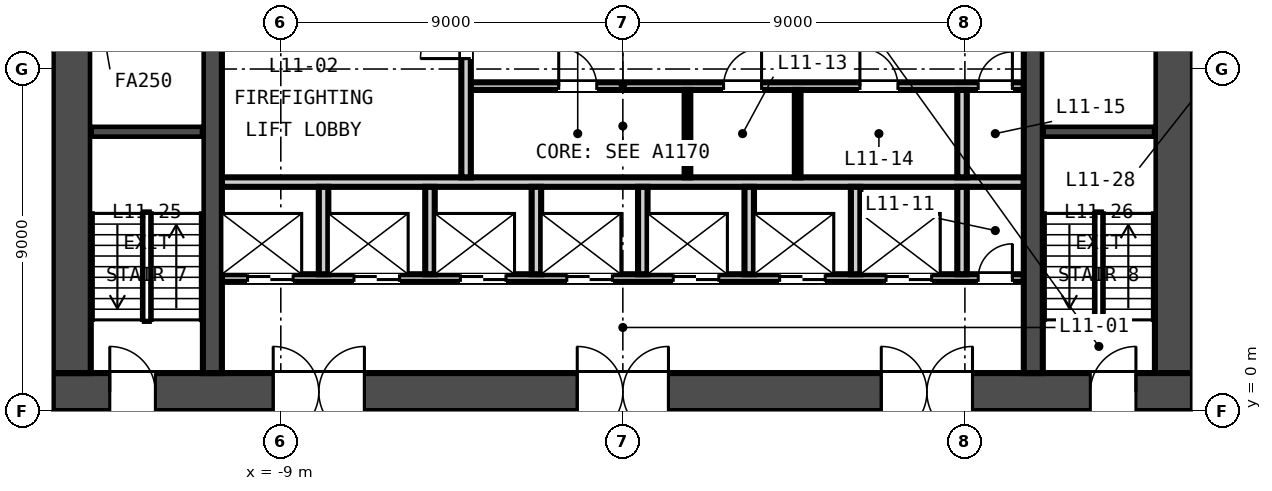
"""IFC4 building model, lengths in metres.
Left out: names, types, materials, properties, quantities, classifications, styles, units other than length and angle.
Written with IfcOpenShell. Run it as: python <this file> out.ifc"""

import sys

from ifc_helpers import new_model, si_unit, direction, frame, frame_2d, origin, place, context, subcontext, project, spatial, rectangle, extrude, element, fill, save


model = new_model("IFC4")
c1 = context("Model", 3, precision=1e-05, world=origin(), true_north=direction((0.0, 1.0)))
c2 = subcontext(c1, "Body", "Model", "MODEL_VIEW")
j1 = project(units=[si_unit("LENGTHUNIT", "METRE"), si_unit("PLANEANGLEUNIT", "RADIAN")], contexts=[c1])
p1 = place(None, origin())
s1 = spatial("IfcSite", under=j1, at=p1, CompositionType="ELEMENT")
p2 = place(p1, origin())
s2 = spatial("IfcBuilding", under=s1, at=p2, CompositionType="ELEMENT")
p3 = place(p2, frame((0.0, 0.0, 54.25)))
s3 = spatial("IfcBuildingStorey", under=s2, at=p3, CompositionType="ELEMENT", Elevation=54.25)
p4 = place(p3, frame((-15.0, 0.5, -0.15), z_axis=(0.0, 0.0, 1.0), x_axis=(1.0, 0.0, 0.0)))
e1 = element("IfcWall", 1, at=p4, inside=s3, PredefinedType="SOLIDWALL", context=c2, shape_type="SweptSolid", body=[
    extrude(rectangle(XDim=30.0, YDim=1.0, at=frame_2d((15.0, 0.0))), origin(), (0.0, 0.0, 1.0), 3.65),
])
p5 = place(p4, frame((5.8, 0.0, 0.15)))
e2 = element("IfcOpeningElement", 2, at=p5, cuts=e1, PredefinedType="OPENING", context=c2, shape_type="SweptSolid", body=[
    extrude(rectangle(XDim=2.4, YDim=2.4, at=frame_2d((1.2, 1.2))), frame((0.0, 0.51, 0.0), z_axis=(0.0, -1.0, 0.0), x_axis=(1.0, 0.0, 0.0)), (0.0, 0.0, 1.0), 1.02),
])
p6 = place(p4, frame((13.8, 0.0, 0.15)))
e3 = element("IfcOpeningElement", 3, at=p6, cuts=e1, PredefinedType="OPENING", context=c2, shape_type="SweptSolid", body=[
    extrude(rectangle(XDim=2.4, YDim=2.4, at=frame_2d((1.2, 1.2))), frame((0.0, 0.51, 0.0), z_axis=(0.0, -1.0, 0.0), x_axis=(1.0, 0.0, 0.0)), (0.0, 0.0, 1.0), 1.02),
])
p7 = place(p4, frame((21.8, 0.0, 0.15)))
e4 = element("IfcOpeningElement", 4, at=p7, cuts=e1, PredefinedType="OPENING", context=c2, shape_type="SweptSolid", body=[
    extrude(rectangle(XDim=2.4, YDim=2.4, at=frame_2d((1.2, 1.2))), frame((0.0, 0.51, 0.0), z_axis=(0.0, -1.0, 0.0), x_axis=(1.0, 0.0, 0.0)), (0.0, 0.0, 1.0), 1.02),
])
p8 = place(p4, frame((1.5, 0.0, 0.15)))
e5 = element("IfcOpeningElement", 5, at=p8, cuts=e1, PredefinedType="OPENING", context=c2, shape_type="SweptSolid", body=[
    extrude(rectangle(XDim=1.2, YDim=2.1, at=frame_2d((0.6, 1.05))), frame((0.0, 0.51, 0.0), z_axis=(0.0, -1.0, 0.0), x_axis=(1.0, 0.0, 0.0)), (0.0, 0.0, 1.0), 1.02),
])
p9 = place(p4, frame((27.3, 0.0, 0.15)))
e6 = element("IfcOpeningElement", 6, at=p9, cuts=e1, PredefinedType="OPENING", context=c2, shape_type="SweptSolid", body=[
    extrude(rectangle(XDim=1.2, YDim=2.1, at=frame_2d((0.6, 1.05))), frame((0.0, 0.51, 0.0), z_axis=(0.0, -1.0, 0.0), x_axis=(1.0, 0.0, 0.0)), (0.0, 0.0, 1.0), 1.02),
])
for number, where, z_axis, x_axis in (
    (7, (-14.5, 1.0, -0.15), (0.0, 0.0, 1.0), (0.0, 1.0, 0.0)),
    (8, (14.5, 1.0, -0.15), (0.0, 0.0, 1.0), (0.0, 1.0, 0.0)),
):
    element("IfcWall", number, at=place(p3, frame(where, z_axis=z_axis, x_axis=x_axis)), inside=s3, PredefinedType="SOLIDWALL", context=c2, shape_type="SweptSolid", body=[
        extrude(rectangle(XDim=13.0, YDim=1.0, at=frame_2d((6.5, 0.0))), origin(), (0.0, 0.0, 1.0), 3.65),
    ])
for number, where, z_axis, x_axis in (
    (9, (-10.8, 1.0, -0.15), (0.0, 0.0, 1.0), (0.0, 1.0, 0.0)),
    (10, (10.8, 1.0, -0.15), (0.0, 0.0, 1.0), (0.0, 1.0, 0.0)),
):
    element("IfcWall", number, at=place(p3, frame(where, z_axis=z_axis, x_axis=x_axis)), inside=s3, PredefinedType="SOLIDWALL", context=c2, shape_type="SweptSolid", body=[
        extrude(rectangle(XDim=13.0, YDim=0.5, at=frame_2d((6.5, 0.0))), origin(), (0.0, 0.0, 1.0), 3.65),
    ])
p10 = place(p3, frame((-10.55, 3.5, 0.0), z_axis=(0.0, 0.0, 1.0), x_axis=(1.0, 0.0, 0.0)))
e11 = element("IfcWall", 11, at=p10, inside=s3, PredefinedType="PARTITIONING", context=c2, shape_type="SweptSolid", body=[
    extrude(rectangle(XDim=21.1, YDim=0.2, at=frame_2d((10.55, 0.0))), origin(), (0.0, 0.0, 1.0), 3.5),
])
p11 = place(p10, frame((0.675, 0.0, 0.0)))
e12 = element("IfcOpeningElement", 12, at=p11, cuts=e11, PredefinedType="OPENING", context=c2, shape_type="SweptSolid", body=[
    extrude(rectangle(XDim=1.2, YDim=2.1, at=frame_2d((0.6, 1.05))), frame((0.0, 0.11, 0.0), z_axis=(0.0, -1.0, 0.0), x_axis=(1.0, 0.0, 0.0)), (0.0, 0.0, 1.0), 0.22),
])
p12 = place(p10, frame((3.475, 0.0, 0.0)))
e13 = element("IfcOpeningElement", 13, at=p12, cuts=e11, PredefinedType="OPENING", context=c2, shape_type="SweptSolid", body=[
    extrude(rectangle(XDim=1.2, YDim=2.1, at=frame_2d((0.6, 1.05))), frame((0.0, 0.11, 0.0), z_axis=(0.0, -1.0, 0.0), x_axis=(1.0, 0.0, 0.0)), (0.0, 0.0, 1.0), 0.22),
])
p13 = place(p10, frame((6.275, 0.0, 0.0)))
e14 = element("IfcOpeningElement", 14, at=p13, cuts=e11, PredefinedType="OPENING", context=c2, shape_type="SweptSolid", body=[
    extrude(rectangle(XDim=1.2, YDim=2.1, at=frame_2d((0.6, 1.05))), frame((0.0, 0.11, 0.0), z_axis=(0.0, -1.0, 0.0), x_axis=(1.0, 0.0, 0.0)), (0.0, 0.0, 1.0), 0.22),
])
p14 = place(p10, frame((9.075, 0.0, 0.0)))
e15 = element("IfcOpeningElement", 15, at=p14, cuts=e11, PredefinedType="OPENING", context=c2, shape_type="SweptSolid", body=[
    extrude(rectangle(XDim=1.2, YDim=2.1, at=frame_2d((0.6, 1.05))), frame((0.0, 0.11, 0.0), z_axis=(0.0, -1.0, 0.0), x_axis=(1.0, 0.0, 0.0)), (0.0, 0.0, 1.0), 0.22),
])
p15 = place(p10, frame((11.875, 0.0, 0.0)))
e16 = element("IfcOpeningElement", 16, at=p15, cuts=e11, PredefinedType="OPENING", context=c2, shape_type="SweptSolid", body=[
    extrude(rectangle(XDim=1.2, YDim=2.1, at=frame_2d((0.6, 1.05))), frame((0.0, 0.11, 0.0), z_axis=(0.0, -1.0, 0.0), x_axis=(1.0, 0.0, 0.0)), (0.0, 0.0, 1.0), 0.22),
])
p16 = place(p10, frame((14.675, 0.0, 0.0)))
e17 = element("IfcOpeningElement", 17, at=p16, cuts=e11, PredefinedType="OPENING", context=c2, shape_type="SweptSolid", body=[
    extrude(rectangle(XDim=1.2, YDim=2.1, at=frame_2d((0.6, 1.05))), frame((0.0, 0.11, 0.0), z_axis=(0.0, -1.0, 0.0), x_axis=(1.0, 0.0, 0.0)), (0.0, 0.0, 1.0), 0.22),
])
p17 = place(p10, frame((17.475, 0.0, 0.0)))
e18 = element("IfcOpeningElement", 18, at=p17, cuts=e11, PredefinedType="OPENING", context=c2, shape_type="SweptSolid", body=[
    extrude(rectangle(XDim=1.2, YDim=2.1, at=frame_2d((0.6, 1.05))), frame((0.0, 0.11, 0.0), z_axis=(0.0, -1.0, 0.0), x_axis=(1.0, 0.0, 0.0)), (0.0, 0.0, 1.0), 0.22),
])
p18 = place(p10, frame((19.9, 0.0, 0.0)))
e19 = element("IfcOpeningElement", 19, at=p18, cuts=e11, PredefinedType="OPENING", context=c2, shape_type="SweptSolid", body=[
    extrude(rectangle(XDim=0.9, YDim=2.1, at=frame_2d((0.45, 1.05))), frame((0.0, 0.11, 0.0), z_axis=(0.0, -1.0, 0.0), x_axis=(1.0, 0.0, 0.0)), (0.0, 0.0, 1.0), 0.22),
])
p19 = place(p3, frame((-10.55, 6.025, 0.0), z_axis=(0.0, 0.0, 1.0), x_axis=(1.0, 0.0, 0.0)))
e20 = element("IfcWall", 20, at=p19, inside=s3, PredefinedType="PARTITIONING", context=c2, shape_type="SweptSolid", body=[
    extrude(rectangle(XDim=21.1, YDim=0.25, at=frame_2d((10.55, 0.0))), origin(), (0.0, 0.0, 1.0), 3.5),
])
p20 = place(p3, frame((-4.125, 8.55, 0.0), z_axis=(0.0, 0.0, 1.0), x_axis=(1.0, 0.0, 0.0)))
e21 = element("IfcWall", 21, at=p20, inside=s3, PredefinedType="PARTITIONING", context=c2, shape_type="SweptSolid", body=[
    extrude(rectangle(XDim=14.675, YDim=0.2, at=frame_2d((7.337, 0.0))), origin(), (0.0, 0.0, 1.0), 3.5),
])
p21 = place(p20, frame((2.438, 0.0, 0.0)))
e22 = element("IfcOpeningElement", 22, at=p21, cuts=e21, PredefinedType="OPENING", context=c2, shape_type="SweptSolid", body=[
    extrude(rectangle(XDim=1.0, YDim=2.1, at=frame_2d((0.5, 1.05))), frame((0.0, 0.11, 0.0), z_axis=(0.0, -1.0, 0.0), x_axis=(1.0, 0.0, 0.0)), (0.0, 0.0, 1.0), 0.22),
])
p22 = place(p20, frame((6.775, 0.0, 0.0)))
e23 = element("IfcOpeningElement", 23, at=p22, cuts=e21, PredefinedType="OPENING", context=c2, shape_type="SweptSolid", body=[
    extrude(rectangle(XDim=1.0, YDim=2.1, at=frame_2d((0.5, 1.05))), frame((0.0, 0.11, 0.0), z_axis=(0.0, -1.0, 0.0), x_axis=(1.0, 0.0, 0.0)), (0.0, 0.0, 1.0), 0.22),
])
p23 = place(p20, frame((10.363, 0.0, 0.0)))
e24 = element("IfcOpeningElement", 24, at=p23, cuts=e21, PredefinedType="OPENING", context=c2, shape_type="SweptSolid", body=[
    extrude(rectangle(XDim=1.0, YDim=2.1, at=frame_2d((0.5, 1.05))), frame((0.0, 0.11, 0.0), z_axis=(0.0, -1.0, 0.0), x_axis=(1.0, 0.0, 0.0)), (0.0, 0.0, 1.0), 0.22),
])
p24 = place(p20, frame((13.475, 0.0, 0.0)))
e25 = element("IfcOpeningElement", 25, at=p24, cuts=e21, PredefinedType="OPENING", context=c2, shape_type="SweptSolid", body=[
    extrude(rectangle(XDim=0.9, YDim=2.1, at=frame_2d((0.45, 1.05))), frame((0.0, 0.11, 0.0), z_axis=(0.0, -1.0, 0.0), x_axis=(1.0, 0.0, 0.0)), (0.0, 0.0, 1.0), 0.22),
])
p25 = place(p3, frame((-4.125, 6.15, 0.0), z_axis=(0.0, 0.0, 1.0), x_axis=(0.0, 1.0, 0.0)))
e26 = element("IfcWall", 26, at=p25, inside=s3, PredefinedType="PARTITIONING", context=c2, shape_type="SweptSolid", body=[
    extrude(rectangle(XDim=4.95, YDim=0.25, at=frame_2d((2.475, 0.0))), origin(), (0.0, 0.0, 1.0), 3.5),
])
p26 = place(p25, frame((3.125, 0.0, 0.0)))
e27 = element("IfcOpeningElement", 27, at=p26, cuts=e26, PredefinedType="OPENING", context=c2, shape_type="SweptSolid", body=[
    extrude(rectangle(XDim=1.2, YDim=2.1, at=frame_2d((0.6, 1.05))), frame((0.0, 0.135, 0.0), z_axis=(0.0, -1.0, 0.0), x_axis=(1.0, 0.0, 0.0)), (0.0, 0.0, 1.0), 0.27),
])
for number, where, z_axis, x_axis in (
    (28, (-7.875, 3.6, 0.0), (0.0, 0.0, 1.0), (0.0, 1.0, 0.0)),
    (29, (-5.075, 3.6, 0.0), (0.0, 0.0, 1.0), (0.0, 1.0, 0.0)),
    (30, (-2.275, 3.6, 0.0), (0.0, 0.0, 1.0), (0.0, 1.0, 0.0)),
    (31, (0.525, 3.6, 0.0), (0.0, 0.0, 1.0), (0.0, 1.0, 0.0)),
    (32, (3.325, 3.6, 0.0), (0.0, 0.0, 1.0), (0.0, 1.0, 0.0)),
    (33, (6.125, 3.6, 0.0), (0.0, 0.0, 1.0), (0.0, 1.0, 0.0)),
    (34, (8.925, 3.6, 0.0), (0.0, 0.0, 1.0), (0.0, 1.0, 0.0)),
):
    element("IfcWall", number, at=place(p3, frame(where, z_axis=z_axis, x_axis=x_axis)), inside=s3, PredefinedType="PARTITIONING", context=c2, shape_type="SweptSolid", body=[
        extrude(rectangle(XDim=2.3, YDim=0.25, at=frame_2d((1.15, 0.0))), origin(), (0.0, 0.0, 1.0), 3.5),
    ])
for number, where, z_axis, x_axis in (
    (35, (1.7, 6.15, 0.0), (0.0, 0.0, 1.0), (0.0, 1.0, 0.0)),
    (36, (4.6, 6.15, 0.0), (0.0, 0.0, 1.0), (0.0, 1.0, 0.0)),
):
    element("IfcWall", number, at=place(p3, frame(where, z_axis=z_axis, x_axis=x_axis)), inside=s3, PredefinedType="PARTITIONING", context=c2, shape_type="SweptSolid", body=[
        extrude(rectangle(XDim=2.3, YDim=0.15, at=frame_2d((1.15, 0.0))), origin(), (0.0, 0.0, 1.0), 3.5),
    ])
p27 = place(p3, frame((8.925, 6.15, 0.0), z_axis=(0.0, 0.0, 1.0), x_axis=(0.0, 1.0, 0.0)))
e37 = element("IfcWall", 37, at=p27, inside=s3, PredefinedType="PARTITIONING", context=c2, shape_type="SweptSolid", body=[
    extrude(rectangle(XDim=2.3, YDim=0.25, at=frame_2d((1.15, 0.0))), origin(), (0.0, 0.0, 1.0), 3.5),
])
for number, where, z_axis, x_axis in (
    (38, (-14.0, 7.35, -0.15), (0.0, 0.0, 1.0), (1.0, 0.0, 0.0)),
    (39, (11.05, 7.35, -0.15), (0.0, 0.0, 1.0), (1.0, 0.0, 0.0)),
):
    element("IfcWall", number, at=place(p3, frame(where, z_axis=z_axis, x_axis=x_axis)), inside=s3, PredefinedType="SOLIDWALL", context=c2, shape_type="SweptSolid", body=[
        extrude(rectangle(XDim=2.95, YDim=0.3, at=frame_2d((1.475, 0.0))), origin(), (0.0, 0.0, 1.0), 3.65),
    ])
p28 = place(p26, origin())
e40 = element("IfcDoor", 40, at=p28, inside=s3, OperationType="SINGLE_SWING_LEFT", PredefinedType="DOOR", context=c2, shape_type="SweptSolid", body=[
    extrude(rectangle(XDim=1.2, YDim=2.1, at=frame_2d((0.6, 1.05))), frame((0.0, 0.025, 0.0), z_axis=(0.0, -1.0, 0.0), x_axis=(1.0, 0.0, 0.0)), (0.0, 0.0, 1.0), 0.05),
])
fill(e27, e40)
p29 = place(p11, origin())
e41 = element("IfcDoor", 41, at=p29, inside=s3, OperationType="DOUBLE_DOOR_SLIDING", PredefinedType="DOOR", context=c2, shape_type="SweptSolid", body=[
    extrude(rectangle(XDim=1.2, YDim=2.1, at=frame_2d((0.6, 1.05))), frame((0.0, 0.025, 0.0), z_axis=(0.0, -1.0, 0.0), x_axis=(1.0, 0.0, 0.0)), (0.0, 0.0, 1.0), 0.05),
])
fill(e12, e41)
p30 = place(p12, origin())
e42 = element("IfcDoor", 42, at=p30, inside=s3, OperationType="DOUBLE_DOOR_SLIDING", PredefinedType="DOOR", context=c2, shape_type="SweptSolid", body=[
    extrude(rectangle(XDim=1.2, YDim=2.1, at=frame_2d((0.6, 1.05))), frame((0.0, 0.025, 0.0), z_axis=(0.0, -1.0, 0.0), x_axis=(1.0, 0.0, 0.0)), (0.0, 0.0, 1.0), 0.05),
])
fill(e13, e42)
p31 = place(p13, origin())
e43 = element("IfcDoor", 43, at=p31, inside=s3, OperationType="DOUBLE_DOOR_SLIDING", PredefinedType="DOOR", context=c2, shape_type="SweptSolid", body=[
    extrude(rectangle(XDim=1.2, YDim=2.1, at=frame_2d((0.6, 1.05))), frame((0.0, 0.025, 0.0), z_axis=(0.0, -1.0, 0.0), x_axis=(1.0, 0.0, 0.0)), (0.0, 0.0, 1.0), 0.05),
])
fill(e14, e43)
p32 = place(p14, origin())
e44 = element("IfcDoor", 44, at=p32, inside=s3, OperationType="DOUBLE_DOOR_SLIDING", PredefinedType="DOOR", context=c2, shape_type="SweptSolid", body=[
    extrude(rectangle(XDim=1.2, YDim=2.1, at=frame_2d((0.6, 1.05))), frame((0.0, 0.025, 0.0), z_axis=(0.0, -1.0, 0.0), x_axis=(1.0, 0.0, 0.0)), (0.0, 0.0, 1.0), 0.05),
])
fill(e15, e44)
p33 = place(p15, origin())
e45 = element("IfcDoor", 45, at=p33, inside=s3, OperationType="DOUBLE_DOOR_SLIDING", PredefinedType="DOOR", context=c2, shape_type="SweptSolid", body=[
    extrude(rectangle(XDim=1.2, YDim=2.1, at=frame_2d((0.6, 1.05))), frame((0.0, 0.025, 0.0), z_axis=(0.0, -1.0, 0.0), x_axis=(1.0, 0.0, 0.0)), (0.0, 0.0, 1.0), 0.05),
])
fill(e16, e45)
p34 = place(p16, origin())
e46 = element("IfcDoor", 46, at=p34, inside=s3, OperationType="DOUBLE_DOOR_SLIDING", PredefinedType="DOOR", context=c2, shape_type="SweptSolid", body=[
    extrude(rectangle(XDim=1.2, YDim=2.1, at=frame_2d((0.6, 1.05))), frame((0.0, 0.025, 0.0), z_axis=(0.0, -1.0, 0.0), x_axis=(1.0, 0.0, 0.0)), (0.0, 0.0, 1.0), 0.05),
])
fill(e17, e46)
p35 = place(p17, origin())
e47 = element("IfcDoor", 47, at=p35, inside=s3, OperationType="DOUBLE_DOOR_SLIDING", PredefinedType="DOOR", context=c2, shape_type="SweptSolid", body=[
    extrude(rectangle(XDim=1.2, YDim=2.1, at=frame_2d((0.6, 1.05))), frame((0.0, 0.025, 0.0), z_axis=(0.0, -1.0, 0.0), x_axis=(1.0, 0.0, 0.0)), (0.0, 0.0, 1.0), 0.05),
])
fill(e18, e47)
p36 = place(p18, origin())
e48 = element("IfcDoor", 48, at=p36, inside=s3, OperationType="SINGLE_SWING_RIGHT", PredefinedType="DOOR", context=c2, shape_type="SweptSolid", body=[
    extrude(rectangle(XDim=0.9, YDim=2.1, at=frame_2d((0.45, 1.05))), frame((0.0, 0.025, 0.0), z_axis=(0.0, -1.0, 0.0), x_axis=(1.0, 0.0, 0.0)), (0.0, 0.0, 1.0), 0.05),
])
fill(e19, e48)
p37 = place(p21, origin())
e49 = element("IfcDoor", 49, at=p37, inside=s3, OperationType="SINGLE_SWING_LEFT", PredefinedType="DOOR", context=c2, shape_type="SweptSolid", body=[
    extrude(rectangle(XDim=1.0, YDim=2.1, at=frame_2d((0.5, 1.05))), frame((0.0, 0.025, 0.0), z_axis=(0.0, -1.0, 0.0), x_axis=(1.0, 0.0, 0.0)), (0.0, 0.0, 1.0), 0.05),
])
fill(e22, e49)
p38 = place(p22, origin())
e50 = element("IfcDoor", 50, at=p38, inside=s3, OperationType="SINGLE_SWING_RIGHT", PredefinedType="DOOR", context=c2, shape_type="SweptSolid", body=[
    extrude(rectangle(XDim=1.0, YDim=2.1, at=frame_2d((0.5, 1.05))), frame((0.0, 0.025, 0.0), z_axis=(0.0, -1.0, 0.0), x_axis=(1.0, 0.0, 0.0)), (0.0, 0.0, 1.0), 0.05),
])
fill(e23, e50)
p39 = place(p23, origin())
e51 = element("IfcDoor", 51, at=p39, inside=s3, OperationType="SINGLE_SWING_LEFT", PredefinedType="DOOR", context=c2, shape_type="SweptSolid", body=[
    extrude(rectangle(XDim=1.0, YDim=2.1, at=frame_2d((0.5, 1.05))), frame((0.0, 0.025, 0.0), z_axis=(0.0, -1.0, 0.0), x_axis=(1.0, 0.0, 0.0)), (0.0, 0.0, 1.0), 0.05),
])
fill(e24, e51)
p40 = place(p24, origin())
e52 = element("IfcDoor", 52, at=p40, inside=s3, OperationType="SINGLE_SWING_RIGHT", PredefinedType="DOOR", context=c2, shape_type="SweptSolid", body=[
    extrude(rectangle(XDim=0.9, YDim=2.1, at=frame_2d((0.45, 1.05))), frame((0.0, 0.025, 0.0), z_axis=(0.0, -1.0, 0.0), x_axis=(1.0, 0.0, 0.0)), (0.0, 0.0, 1.0), 0.05),
])
fill(e25, e52)
p41 = place(p5, origin())
e53 = element("IfcDoor", 53, at=p41, inside=s3, OperationType="DOUBLE_DOOR_DOUBLE_SWING", PredefinedType="DOOR", context=c2, shape_type="SweptSolid", body=[
    extrude(rectangle(XDim=2.4, YDim=2.4, at=frame_2d((1.2, 1.2))), frame((0.0, 0.025, 0.0), z_axis=(0.0, -1.0, 0.0), x_axis=(1.0, 0.0, 0.0)), (0.0, 0.0, 1.0), 0.05),
])
fill(e2, e53)
p42 = place(p6, origin())
e54 = element("IfcDoor", 54, at=p42, inside=s3, OperationType="DOUBLE_DOOR_DOUBLE_SWING", PredefinedType="DOOR", context=c2, shape_type="SweptSolid", body=[
    extrude(rectangle(XDim=2.4, YDim=2.4, at=frame_2d((1.2, 1.2))), frame((0.0, 0.025, 0.0), z_axis=(0.0, -1.0, 0.0), x_axis=(1.0, 0.0, 0.0)), (0.0, 0.0, 1.0), 0.05),
])
fill(e3, e54)
p43 = place(p7, origin())
e55 = element("IfcDoor", 55, at=p43, inside=s3, OperationType="DOUBLE_DOOR_DOUBLE_SWING", PredefinedType="DOOR", context=c2, shape_type="SweptSolid", body=[
    extrude(rectangle(XDim=2.4, YDim=2.4, at=frame_2d((1.2, 1.2))), frame((0.0, 0.025, 0.0), z_axis=(0.0, -1.0, 0.0), x_axis=(1.0, 0.0, 0.0)), (0.0, 0.0, 1.0), 0.05),
])
fill(e4, e55)
p44 = place(p8, origin())
e56 = element("IfcDoor", 56, at=p44, inside=s3, OperationType="SINGLE_SWING_LEFT", PredefinedType="DOOR", context=c2, shape_type="SweptSolid", body=[
    extrude(rectangle(XDim=1.2, YDim=2.1, at=frame_2d((0.6, 1.05))), frame((0.0, 0.025, 0.0), z_axis=(0.0, -1.0, 0.0), x_axis=(1.0, 0.0, 0.0)), (0.0, 0.0, 1.0), 0.05),
])
fill(e5, e56)
p45 = place(p9, origin())
e57 = element("IfcDoor", 57, at=p45, inside=s3, OperationType="SINGLE_SWING_RIGHT", PredefinedType="DOOR", context=c2, shape_type="SweptSolid", body=[
    extrude(rectangle(XDim=1.2, YDim=2.1, at=frame_2d((0.6, 1.05))), frame((0.0, 0.025, 0.0), z_axis=(0.0, -1.0, 0.0), x_axis=(1.0, 0.0, 0.0)), (0.0, 0.0, 1.0), 0.05),
])
fill(e6, e57)
save(model, sys.argv[1])
